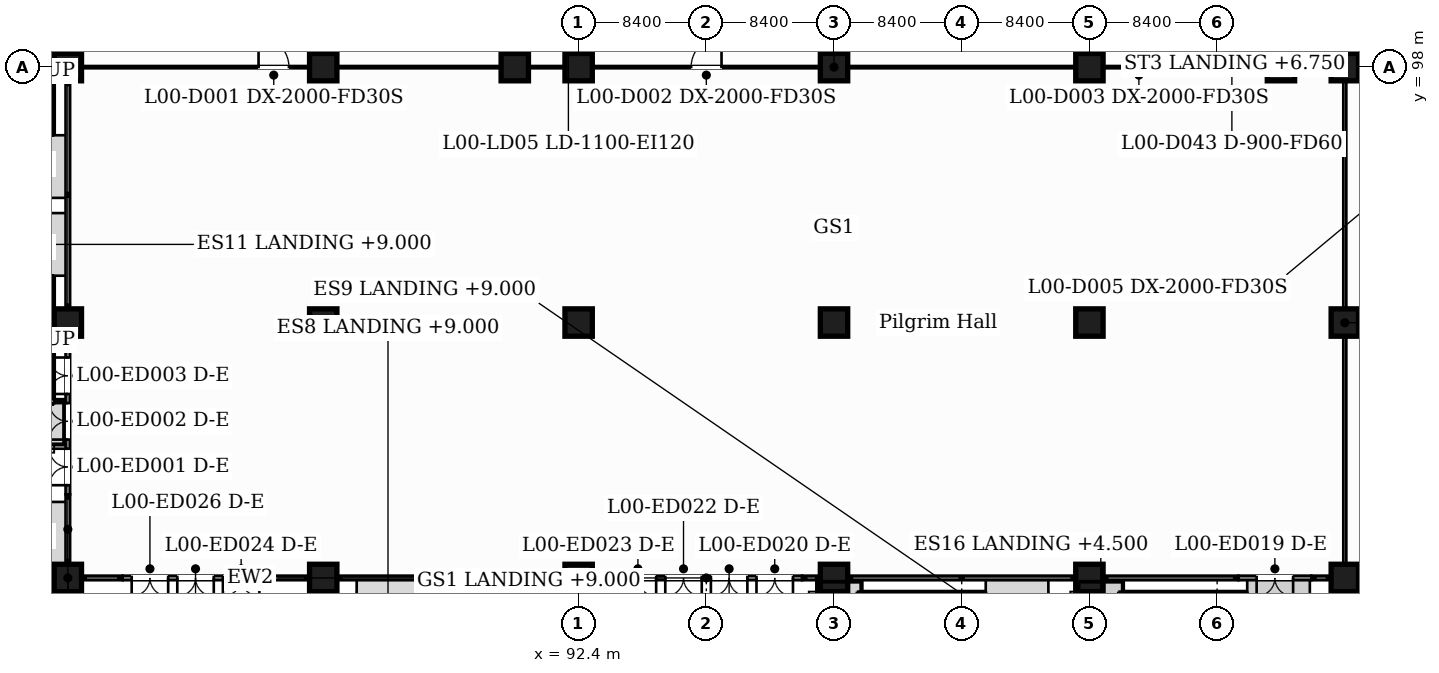
"""IFC4 building model, lengths in metres.
Left out: names, types, materials, properties, quantities, classifications, styles, units other than length and angle.
Written with IfcOpenShell. Run it as: python <this file> out.ifc"""

import sys

from ifc_helpers import new_model, si_unit, direction, frame, frame_2d, origin, origin_2d, place, context, subcontext, project, spatial, rectangle, extrude, element, fill, save


model = new_model("IFC4")
c1 = context("Model", 3, precision=1e-05, world=origin(), true_north=direction((0.0, 1.0)))
c2 = subcontext(c1, "Body", "Model", "MODEL_VIEW")
j1 = project(units=[si_unit("LENGTHUNIT", "METRE"), si_unit("PLANEANGLEUNIT", "RADIAN")], contexts=[c1])
p1 = place(None, origin())
s1 = spatial("IfcSite", under=j1, at=p1, CompositionType="ELEMENT")
p2 = place(p1, origin())
s2 = spatial("IfcBuilding", under=s1, at=p2, CompositionType="ELEMENT")
p3 = place(p2, origin())
s3 = spatial("IfcBuildingStorey", under=s2, at=p3, CompositionType="ELEMENT", Elevation=0.0)
for number, where, z_axis, x_axis in (
    (1, (58.8, 64.4, -0.35), (0.0, 0.0, 1.0), (1.0, 0.0, 0.0)),
    (2, (75.6, 64.4, -0.35), (0.0, 0.0, 1.0), (1.0, 0.0, 0.0)),
    (3, (92.4, 64.4, -0.35), (0.0, 0.0, 1.0), (1.0, 0.0, 0.0)),
    (4, (109.2, 64.4, -0.35), (0.0, 0.0, 1.0), (1.0, 0.0, 0.0)),
    (5, (126.0, 64.4, -0.35), (0.0, 0.0, 1.0), (1.0, 0.0, 0.0)),
    (6, (142.8, 64.4, -0.35), (0.0, 0.0, 1.0), (1.0, 0.0, 0.0)),
    (7, (58.8, 81.2, -0.35), (0.0, 0.0, 1.0), (1.0, 0.0, 0.0)),
    (8, (75.6, 81.2, -0.35), (0.0, 0.0, 1.0), (1.0, 0.0, 0.0)),
    (9, (92.4, 81.2, -0.35), (0.0, 0.0, 1.0), (1.0, 0.0, 0.0)),
    (10, (109.2, 81.2, -0.35), (0.0, 0.0, 1.0), (1.0, 0.0, 0.0)),
    (11, (126.0, 81.2, -0.35), (0.0, 0.0, 1.0), (1.0, 0.0, 0.0)),
    (12, (142.8, 81.2, -0.35), (0.0, 0.0, 1.0), (1.0, 0.0, 0.0)),
    (13, (58.8, 98.0, -0.35), (0.0, 0.0, 1.0), (1.0, 0.0, 0.0)),
    (14, (75.6, 98.0, -0.35), (0.0, 0.0, 1.0), (1.0, 0.0, 0.0)),
    (15, (88.2, 98.0, -0.35), (0.0, 0.0, 1.0), (1.0, 0.0, 0.0)),
    (16, (92.4, 98.0, -0.35), (0.0, 0.0, 1.0), (1.0, 0.0, 0.0)),
    (17, (109.2, 98.0, -0.35), (0.0, 0.0, 1.0), (1.0, 0.0, 0.0)),
    (18, (126.0, 98.0, -0.35), (0.0, 0.0, 1.0), (1.0, 0.0, 0.0)),
    (19, (138.6, 98.0, -0.35), (0.0, 0.0, 1.0), (1.0, 0.0, 0.0)),
    (20, (142.8, 98.0, -0.35), (0.0, 0.0, 1.0), (1.0, 0.0, 0.0)),
):
    element("IfcColumn", number, at=place(p3, frame(where, z_axis=z_axis, x_axis=x_axis)), inside=s3, PredefinedType="COLUMN", context=c2, shape_type="SweptSolid", body=[
        extrude(rectangle(XDim=1.8, YDim=1.8, at=origin_2d()), origin(), (0.0, 0.0, 1.0), 9.35),
    ])
p4 = place(p3, frame((58.8, 69.9, 0.0), z_axis=(0.0, 0.0, 1.0), x_axis=(0.0, 1.0, 0.0)))
e21 = element("IfcWall", 21, at=p4, inside=s3, PredefinedType="SOLIDWALL", context=c2, shape_type="SweptSolid", body=[
    extrude(rectangle(XDim=9.6, YDim=0.3, at=frame_2d((4.8, 0.0))), origin(), (0.0, 0.0, 1.0), 8.1),
])
p5 = place(p4, frame((0.6, 0.0, 0.0)))
e22 = element("IfcOpeningElement", 22, at=p5, cuts=e21, PredefinedType="OPENING", context=c2, shape_type="SweptSolid", body=[
    extrude(rectangle(XDim=2.4, YDim=2.4, at=frame_2d((1.2, 1.2))), frame((0.0, 0.16, 0.0), z_axis=(0.0, -1.0, 0.0), x_axis=(1.0, 0.0, 0.0)), (0.0, 0.0, 1.0), 0.32),
])
p6 = place(p4, frame((3.6, 0.0, 0.0)))
e23 = element("IfcOpeningElement", 23, at=p6, cuts=e21, PredefinedType="OPENING", context=c2, shape_type="SweptSolid", body=[
    extrude(rectangle(XDim=2.4, YDim=2.4, at=frame_2d((1.2, 1.2))), frame((0.0, 0.16, 0.0), z_axis=(0.0, -1.0, 0.0), x_axis=(1.0, 0.0, 0.0)), (0.0, 0.0, 1.0), 0.32),
])
p7 = place(p4, frame((6.6, 0.0, 0.0)))
e24 = element("IfcOpeningElement", 24, at=p7, cuts=e21, PredefinedType="OPENING", context=c2, shape_type="SweptSolid", body=[
    extrude(rectangle(XDim=2.4, YDim=2.4, at=frame_2d((1.2, 1.2))), frame((0.0, 0.16, 0.0), z_axis=(0.0, -1.0, 0.0), x_axis=(1.0, 0.0, 0.0)), (0.0, 0.0, 1.0), 0.32),
])
p8 = place(p3, frame((140.6, 64.4, 0.0), z_axis=(0.0, 0.0, 1.0), x_axis=(-1.0, 0.0, 0.0)))
e25 = element("IfcWall", 25, at=p8, inside=s3, PredefinedType="SOLIDWALL", context=c2, shape_type="SweptSolid", body=[
    extrude(rectangle(XDim=4.8, YDim=0.3, at=frame_2d((2.4, 0.0))), origin(), (0.0, 0.0, 1.0), 8.1),
])
p9 = place(p8, frame((1.2, 0.0, 0.0)))
e26 = element("IfcOpeningElement", 26, at=p9, cuts=e25, PredefinedType="OPENING", context=c2, shape_type="SweptSolid", body=[
    extrude(rectangle(XDim=2.4, YDim=2.4, at=frame_2d((1.2, 1.2))), frame((0.0, 0.16, 0.0), z_axis=(0.0, -1.0, 0.0), x_axis=(1.0, 0.0, 0.0)), (0.0, 0.0, 1.0), 0.32),
])
p10 = place(p3, frame((107.1, 64.4, 0.0), z_axis=(0.0, 0.0, 1.0), x_axis=(-1.0, 0.0, 0.0)))
e27 = element("IfcWall", 27, at=p10, inside=s3, PredefinedType="SOLIDWALL", context=c2, shape_type="SweptSolid", body=[
    extrude(rectangle(XDim=12.6, YDim=0.3, at=frame_2d((6.3, 0.0))), origin(), (0.0, 0.0, 1.0), 8.1),
])
p11 = place(p10, frame((0.6, 0.0, 0.0)))
e28 = element("IfcOpeningElement", 28, at=p11, cuts=e27, PredefinedType="OPENING", context=c2, shape_type="SweptSolid", body=[
    extrude(rectangle(XDim=2.4, YDim=2.4, at=frame_2d((1.2, 1.2))), frame((0.0, 0.16, 0.0), z_axis=(0.0, -1.0, 0.0), x_axis=(1.0, 0.0, 0.0)), (0.0, 0.0, 1.0), 0.32),
])
p12 = place(p10, frame((3.6, 0.0, 0.0)))
e29 = element("IfcOpeningElement", 29, at=p12, cuts=e27, PredefinedType="OPENING", context=c2, shape_type="SweptSolid", body=[
    extrude(rectangle(XDim=2.4, YDim=2.4, at=frame_2d((1.2, 1.2))), frame((0.0, 0.16, 0.0), z_axis=(0.0, -1.0, 0.0), x_axis=(1.0, 0.0, 0.0)), (0.0, 0.0, 1.0), 0.32),
])
p13 = place(p10, frame((6.6, 0.0, 0.0)))
e30 = element("IfcOpeningElement", 30, at=p13, cuts=e27, PredefinedType="OPENING", context=c2, shape_type="SweptSolid", body=[
    extrude(rectangle(XDim=2.4, YDim=2.4, at=frame_2d((1.2, 1.2))), frame((0.0, 0.16, 0.0), z_axis=(0.0, -1.0, 0.0), x_axis=(1.0, 0.0, 0.0)), (0.0, 0.0, 1.0), 0.32),
])
p14 = place(p10, frame((9.6, 0.0, 0.0)))
e31 = element("IfcOpeningElement", 31, at=p14, cuts=e27, PredefinedType="OPENING", context=c2, shape_type="SweptSolid", body=[
    extrude(rectangle(XDim=2.4, YDim=2.4, at=frame_2d((1.2, 1.2))), frame((0.0, 0.16, 0.0), z_axis=(0.0, -1.0, 0.0), x_axis=(1.0, 0.0, 0.0)), (0.0, 0.0, 1.0), 0.32),
])
p15 = place(p3, frame((72.0, 64.4, 0.0), z_axis=(0.0, 0.0, 1.0), x_axis=(-1.0, 0.0, 0.0)))
e32 = element("IfcWall", 32, at=p15, inside=s3, PredefinedType="SOLIDWALL", context=c2, shape_type="SweptSolid", body=[
    extrude(rectangle(XDim=9.6, YDim=0.3, at=frame_2d((4.8, 0.0))), origin(), (0.0, 0.0, 1.0), 8.1),
])
p16 = place(p15, frame((0.6, 0.0, 0.0)))
e33 = element("IfcOpeningElement", 33, at=p16, cuts=e32, PredefinedType="OPENING", context=c2, shape_type="SweptSolid", body=[
    extrude(rectangle(XDim=2.4, YDim=2.4, at=frame_2d((1.2, 1.2))), frame((0.0, 0.16, 0.0), z_axis=(0.0, -1.0, 0.0), x_axis=(1.0, 0.0, 0.0)), (0.0, 0.0, 1.0), 0.32),
])
p17 = place(p15, frame((3.6, 0.0, 0.0)))
e34 = element("IfcOpeningElement", 34, at=p17, cuts=e32, PredefinedType="OPENING", context=c2, shape_type="SweptSolid", body=[
    extrude(rectangle(XDim=2.4, YDim=2.4, at=frame_2d((1.2, 1.2))), frame((0.0, 0.16, 0.0), z_axis=(0.0, -1.0, 0.0), x_axis=(1.0, 0.0, 0.0)), (0.0, 0.0, 1.0), 0.32),
])
p18 = place(p15, frame((6.6, 0.0, 0.0)))
e35 = element("IfcOpeningElement", 35, at=p18, cuts=e32, PredefinedType="OPENING", context=c2, shape_type="SweptSolid", body=[
    extrude(rectangle(XDim=2.4, YDim=2.4, at=frame_2d((1.2, 1.2))), frame((0.0, 0.16, 0.0), z_axis=(0.0, -1.0, 0.0), x_axis=(1.0, 0.0, 0.0)), (0.0, 0.0, 1.0), 0.32),
])
p19 = place(p3, frame((58.85, 98.0, 0.0), z_axis=(0.0, 0.0, 1.0), x_axis=(1.0, 0.0, 0.0)))
e36 = element("IfcWall", 36, at=p19, inside=s3, PredefinedType="PARTITIONING", context=c2, shape_type="SweptSolid", body=[
    extrude(rectangle(XDim=100.7, YDim=0.15, at=frame_2d((50.35, 0.0))), origin(), (0.0, 0.0, 1.0), 8.5),
])
p20 = place(p19, frame((12.495, 0.0, 0.0)))
e37 = element("IfcOpeningElement", 37, at=p20, cuts=e36, PredefinedType="OPENING", context=c2, shape_type="SweptSolid", body=[
    extrude(rectangle(XDim=2.0, YDim=2.1, at=frame_2d((1.0, 1.05))), frame((0.0, 0.085, 0.0), z_axis=(0.0, -1.0, 0.0), x_axis=(1.0, 0.0, 0.0)), (0.0, 0.0, 1.0), 0.17),
])
p21 = place(p19, frame((40.95, 0.0, 0.0)))
e38 = element("IfcOpeningElement", 38, at=p21, cuts=e36, PredefinedType="OPENING", context=c2, shape_type="SweptSolid", body=[
    extrude(rectangle(XDim=2.0, YDim=2.1, at=frame_2d((1.0, 1.05))), frame((0.0, 0.085, 0.0), z_axis=(0.0, -1.0, 0.0), x_axis=(1.0, 0.0, 0.0)), (0.0, 0.0, 1.0), 0.17),
])
p22 = place(p19, frame((69.405, 0.0, 0.0)))
e39 = element("IfcOpeningElement", 39, at=p22, cuts=e36, PredefinedType="OPENING", context=c2, shape_type="SweptSolid", body=[
    extrude(rectangle(XDim=2.0, YDim=2.1, at=frame_2d((1.0, 1.05))), frame((0.0, 0.085, 0.0), z_axis=(0.0, -1.0, 0.0), x_axis=(1.0, 0.0, 0.0)), (0.0, 0.0, 1.0), 0.17),
])
p23 = place(p19, frame((87.825, 0.0, 0.0)))
e40 = element("IfcOpeningElement", 40, at=p23, cuts=e36, PredefinedType="OPENING", context=c2, shape_type="SweptSolid", body=[
    extrude(rectangle(XDim=2.0, YDim=2.1, at=frame_2d((1.0, 1.05))), frame((0.0, 0.085, 0.0), z_axis=(0.0, -1.0, 0.0), x_axis=(1.0, 0.0, 0.0)), (0.0, 0.0, 1.0), 0.17),
])
p24 = place(p19, frame((94.875, 0.0, 0.0)))
e41 = element("IfcOpeningElement", 41, at=p24, cuts=e36, PredefinedType="OPENING", context=c2, shape_type="SweptSolid", body=[
    extrude(rectangle(XDim=2.0, YDim=2.1, at=frame_2d((1.0, 1.05))), frame((0.0, 0.085, 0.0), z_axis=(0.0, -1.0, 0.0), x_axis=(1.0, 0.0, 0.0)), (0.0, 0.0, 1.0), 0.17),
])
p25 = place(p3, frame((142.8, 64.45, 0.0), z_axis=(0.0, 0.0, 1.0), x_axis=(0.0, 1.0, 0.0)))
e42 = element("IfcWall", 42, at=p25, inside=s3, PredefinedType="PARTITIONING", context=c2, shape_type="SweptSolid", body=[
    extrude(rectangle(XDim=33.475, YDim=0.2, at=frame_2d((16.738, 0.0))), origin(), (0.0, 0.0, 1.0), 8.5),
])
p26 = place(p5, origin())
e43 = element("IfcDoor", 43, at=p26, inside=s3, OperationType="DOUBLE_DOOR_DOUBLE_SWING", PredefinedType="DOOR", context=c2, shape_type="SweptSolid", body=[
    extrude(rectangle(XDim=2.4, YDim=2.4, at=frame_2d((1.2, 1.2))), frame((0.0, 0.025, 0.0), z_axis=(0.0, -1.0, 0.0), x_axis=(1.0, 0.0, 0.0)), (0.0, 0.0, 1.0), 0.05),
])
fill(e22, e43)
p27 = place(p6, origin())
e44 = element("IfcDoor", 44, at=p27, inside=s3, OperationType="DOUBLE_DOOR_DOUBLE_SWING", PredefinedType="DOOR", context=c2, shape_type="SweptSolid", body=[
    extrude(rectangle(XDim=2.4, YDim=2.4, at=frame_2d((1.2, 1.2))), frame((0.0, 0.025, 0.0), z_axis=(0.0, -1.0, 0.0), x_axis=(1.0, 0.0, 0.0)), (0.0, 0.0, 1.0), 0.05),
])
fill(e23, e44)
p28 = place(p7, origin())
e45 = element("IfcDoor", 45, at=p28, inside=s3, OperationType="DOUBLE_DOOR_DOUBLE_SWING", PredefinedType="DOOR", context=c2, shape_type="SweptSolid", body=[
    extrude(rectangle(XDim=2.4, YDim=2.4, at=frame_2d((1.2, 1.2))), frame((0.0, 0.025, 0.0), z_axis=(0.0, -1.0, 0.0), x_axis=(1.0, 0.0, 0.0)), (0.0, 0.0, 1.0), 0.05),
])
fill(e24, e45)
p29 = place(p9, origin())
e46 = element("IfcDoor", 46, at=p29, inside=s3, OperationType="DOUBLE_DOOR_DOUBLE_SWING", PredefinedType="DOOR", context=c2, shape_type="SweptSolid", body=[
    extrude(rectangle(XDim=2.4, YDim=2.4, at=frame_2d((1.2, 1.2))), frame((0.0, 0.025, 0.0), z_axis=(0.0, -1.0, 0.0), x_axis=(1.0, 0.0, 0.0)), (0.0, 0.0, 1.0), 0.05),
])
fill(e26, e46)
p30 = place(p11, origin())
e47 = element("IfcDoor", 47, at=p30, inside=s3, OperationType="DOUBLE_DOOR_DOUBLE_SWING", PredefinedType="DOOR", context=c2, shape_type="SweptSolid", body=[
    extrude(rectangle(XDim=2.4, YDim=2.4, at=frame_2d((1.2, 1.2))), frame((0.0, 0.025, 0.0), z_axis=(0.0, -1.0, 0.0), x_axis=(1.0, 0.0, 0.0)), (0.0, 0.0, 1.0), 0.05),
])
fill(e28, e47)
p31 = place(p12, origin())
e48 = element("IfcDoor", 48, at=p31, inside=s3, OperationType="DOUBLE_DOOR_DOUBLE_SWING", PredefinedType="DOOR", context=c2, shape_type="SweptSolid", body=[
    extrude(rectangle(XDim=2.4, YDim=2.4, at=frame_2d((1.2, 1.2))), frame((0.0, 0.025, 0.0), z_axis=(0.0, -1.0, 0.0), x_axis=(1.0, 0.0, 0.0)), (0.0, 0.0, 1.0), 0.05),
])
fill(e29, e48)
p32 = place(p13, origin())
e49 = element("IfcDoor", 49, at=p32, inside=s3, OperationType="DOUBLE_DOOR_DOUBLE_SWING", PredefinedType="DOOR", context=c2, shape_type="SweptSolid", body=[
    extrude(rectangle(XDim=2.4, YDim=2.4, at=frame_2d((1.2, 1.2))), frame((0.0, 0.025, 0.0), z_axis=(0.0, -1.0, 0.0), x_axis=(1.0, 0.0, 0.0)), (0.0, 0.0, 1.0), 0.05),
])
fill(e30, e49)
p33 = place(p14, origin())
e50 = element("IfcDoor", 50, at=p33, inside=s3, OperationType="DOUBLE_DOOR_DOUBLE_SWING", PredefinedType="DOOR", context=c2, shape_type="SweptSolid", body=[
    extrude(rectangle(XDim=2.4, YDim=2.4, at=frame_2d((1.2, 1.2))), frame((0.0, 0.025, 0.0), z_axis=(0.0, -1.0, 0.0), x_axis=(1.0, 0.0, 0.0)), (0.0, 0.0, 1.0), 0.05),
])
fill(e31, e50)
p34 = place(p16, origin())
e51 = element("IfcDoor", 51, at=p34, inside=s3, OperationType="DOUBLE_DOOR_DOUBLE_SWING", PredefinedType="DOOR", context=c2, shape_type="SweptSolid", body=[
    extrude(rectangle(XDim=2.4, YDim=2.4, at=frame_2d((1.2, 1.2))), frame((0.0, 0.025, 0.0), z_axis=(0.0, -1.0, 0.0), x_axis=(1.0, 0.0, 0.0)), (0.0, 0.0, 1.0), 0.05),
])
fill(e33, e51)
p35 = place(p17, origin())
e52 = element("IfcDoor", 52, at=p35, inside=s3, OperationType="DOUBLE_DOOR_DOUBLE_SWING", PredefinedType="DOOR", context=c2, shape_type="SweptSolid", body=[
    extrude(rectangle(XDim=2.4, YDim=2.4, at=frame_2d((1.2, 1.2))), frame((0.0, 0.025, 0.0), z_axis=(0.0, -1.0, 0.0), x_axis=(1.0, 0.0, 0.0)), (0.0, 0.0, 1.0), 0.05),
])
fill(e34, e52)
p36 = place(p18, origin())
e53 = element("IfcDoor", 53, at=p36, inside=s3, OperationType="DOUBLE_DOOR_DOUBLE_SWING", PredefinedType="DOOR", context=c2, shape_type="SweptSolid", body=[
    extrude(rectangle(XDim=2.4, YDim=2.4, at=frame_2d((1.2, 1.2))), frame((0.0, 0.025, 0.0), z_axis=(0.0, -1.0, 0.0), x_axis=(1.0, 0.0, 0.0)), (0.0, 0.0, 1.0), 0.05),
])
fill(e35, e53)
p37 = place(p20, origin())
e54 = element("IfcDoor", 54, at=p37, inside=s3, OperationType="SINGLE_SWING_LEFT", PredefinedType="DOOR", context=c2, shape_type="SweptSolid", body=[
    extrude(rectangle(XDim=2.0, YDim=2.1, at=frame_2d((1.0, 1.05))), frame((0.0, 0.025, 0.0), z_axis=(0.0, -1.0, 0.0), x_axis=(1.0, 0.0, 0.0)), (0.0, 0.0, 1.0), 0.05),
])
fill(e37, e54)
p38 = place(p21, origin())
e55 = element("IfcDoor", 55, at=p38, inside=s3, OperationType="SINGLE_SWING_RIGHT", PredefinedType="DOOR", context=c2, shape_type="SweptSolid", body=[
    extrude(rectangle(XDim=2.0, YDim=2.1, at=frame_2d((1.0, 1.05))), frame((0.0, 0.025, 0.0), z_axis=(0.0, -1.0, 0.0), x_axis=(1.0, 0.0, 0.0)), (0.0, 0.0, 1.0), 0.05),
])
fill(e38, e55)
p39 = place(p22, origin())
e56 = element("IfcDoor", 56, at=p39, inside=s3, OperationType="SINGLE_SWING_LEFT", PredefinedType="DOOR", context=c2, shape_type="SweptSolid", body=[
    extrude(rectangle(XDim=2.0, YDim=2.1, at=frame_2d((1.0, 1.05))), frame((0.0, 0.025, 0.0), z_axis=(0.0, -1.0, 0.0), x_axis=(1.0, 0.0, 0.0)), (0.0, 0.0, 1.0), 0.05),
])
fill(e39, e56)
save(model, sys.argv[1])
